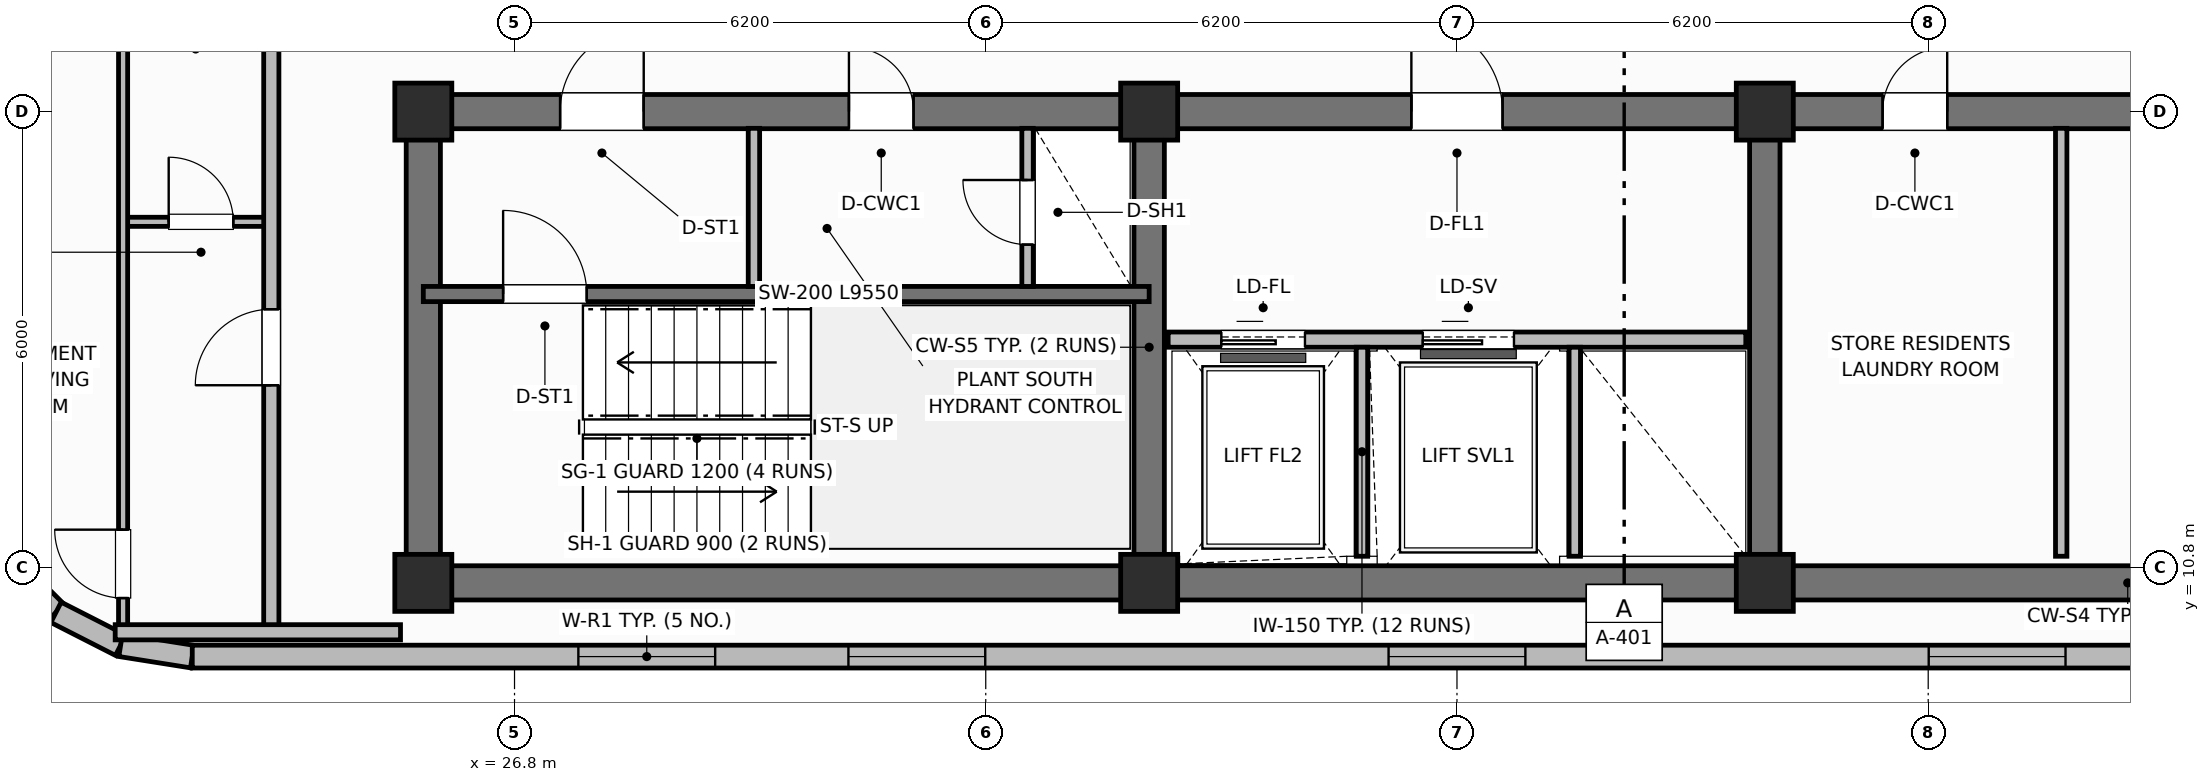
"""IFC4 building model, lengths in metres.
Left out: names, types, materials, properties, quantities, classifications, styles, units other than length and angle.
Written with IfcOpenShell. Run it as: python <this file> out.ifc"""

import sys

from ifc_helpers import new_model, si_unit, direction, frame, frame_2d, origin, origin_2d, place, context, subcontext, project, spatial, rectangle, extrude, element, fill, save


model = new_model("IFC4")
c1 = context("Model", 3, precision=1e-05, world=origin(), true_north=direction((0.0, 1.0)))
c2 = subcontext(c1, "Body", "Model", "MODEL_VIEW")
j1 = project(units=[si_unit("LENGTHUNIT", "METRE"), si_unit("PLANEANGLEUNIT", "RADIAN")], contexts=[c1])
p1 = place(None, origin())
s1 = spatial("IfcSite", under=j1, at=p1, CompositionType="ELEMENT")
p2 = place(p1, origin())
s2 = spatial("IfcBuilding", under=s1, at=p2, CompositionType="ELEMENT")
p3 = place(p2, frame((0.0, 0.0, 278.7)))
s3 = spatial("IfcBuildingStorey", under=s2, at=p3, CompositionType="ELEMENT", Elevation=278.7)
p4 = place(p3, frame((52.8, 10.6, 0.0), z_axis=(0.0, 0.0, 1.0), x_axis=(-1.0, 0.0, 0.0)))
e1 = element("IfcWall", 1, at=p4, inside=s3, PredefinedType="SHEAR", context=c2, shape_type="SweptSolid", body=[
    extrude(rectangle(XDim=27.2, YDim=0.45, at=frame_2d((13.6, 0.0))), origin(), (0.0, 0.0, 1.0), 3.7),
])
p5 = place(p3, frame((25.6, 10.825, 0.0), z_axis=(0.0, 0.0, 1.0), x_axis=(0.0, 1.0, 0.0)))
e2 = element("IfcWall", 2, at=p5, inside=s3, PredefinedType="SHEAR", context=c2, shape_type="SweptSolid", body=[
    extrude(rectangle(XDim=5.75, YDim=0.45, at=frame_2d((2.875, 0.0))), origin(), (0.0, 0.0, 1.0), 3.7),
])
p6 = place(p3, frame((25.6, 16.8, 0.0), z_axis=(0.0, 0.0, 1.0), x_axis=(1.0, 0.0, 0.0)))
e3 = element("IfcWall", 3, at=p6, inside=s3, PredefinedType="SHEAR", context=c2, shape_type="SweptSolid", body=[
    extrude(rectangle(XDim=27.2, YDim=0.45, at=frame_2d((13.6, 0.0))), origin(), (0.0, 0.0, 1.0), 3.7),
])
p7 = place(p6, frame((1.8, 0.0, 0.0)))
e4 = element("IfcOpeningElement", 4, at=p7, cuts=e3, PredefinedType="OPENING", context=c2, shape_type="SweptSolid", body=[
    extrude(rectangle(XDim=1.1, YDim=2.15, at=frame_2d((0.55, 1.075))), frame((0.0, 0.235, 0.0), z_axis=(0.0, -1.0, 0.0), x_axis=(1.0, 0.0, 0.0)), (0.0, 0.0, 1.0), 0.47),
])
p8 = place(p6, frame((5.6, 0.0, 0.0)))
e5 = element("IfcOpeningElement", 5, at=p8, cuts=e3, PredefinedType="OPENING", context=c2, shape_type="SweptSolid", body=[
    extrude(rectangle(XDim=0.85, YDim=2.1, at=frame_2d((0.425, 1.05))), frame((0.0, 0.235, 0.0), z_axis=(0.0, -1.0, 0.0), x_axis=(1.0, 0.0, 0.0)), (0.0, 0.0, 1.0), 0.47),
])
p9 = place(p6, frame((13.0, 0.0, 0.0)))
e6 = element("IfcOpeningElement", 6, at=p9, cuts=e3, PredefinedType="OPENING", context=c2, shape_type="SweptSolid", body=[
    extrude(rectangle(XDim=1.2, YDim=2.15, at=frame_2d((0.6, 1.075))), frame((0.0, 0.235, 0.0), z_axis=(0.0, -1.0, 0.0), x_axis=(1.0, 0.0, 0.0)), (0.0, 0.0, 1.0), 0.47),
])
p10 = place(p6, frame((19.2, 0.0, 0.0)))
e7 = element("IfcOpeningElement", 7, at=p10, cuts=e3, PredefinedType="OPENING", context=c2, shape_type="SweptSolid", body=[
    extrude(rectangle(XDim=0.85, YDim=2.1, at=frame_2d((0.425, 1.05))), frame((0.0, 0.235, 0.0), z_axis=(0.0, -1.0, 0.0), x_axis=(1.0, 0.0, 0.0)), (0.0, 0.0, 1.0), 0.47),
])
p11 = place(p6, frame((23.8, 0.0, 0.0)))
e8 = element("IfcOpeningElement", 8, at=p11, cuts=e3, PredefinedType="OPENING", context=c2, shape_type="SweptSolid", body=[
    extrude(rectangle(XDim=0.9, YDim=2.1, at=frame_2d((0.45, 1.05))), frame((0.0, 0.235, 0.0), z_axis=(0.0, -1.0, 0.0), x_axis=(1.0, 0.0, 0.0)), (0.0, 0.0, 1.0), 0.47),
])
for number, where, z_axis, x_axis in (
    (9, (35.15, 10.825, 0.0), (0.0, 0.0, 1.0), (0.0, 1.0, 0.0)),
    (10, (43.25, 10.825, 0.0), (0.0, 0.0, 1.0), (0.0, 1.0, 0.0)),
):
    element("IfcWall", number, at=place(p3, frame(where, z_axis=z_axis, x_axis=x_axis)), inside=s3, PredefinedType="SHEAR", context=c2, shape_type="SweptSolid", body=[
        extrude(rectangle(XDim=5.75, YDim=0.4, at=frame_2d((2.875, 0.0))), origin(), (0.0, 0.0, 1.0), 3.7),
    ])
for number, where, z_axis, x_axis in (
    (11, (25.6, 10.6, 0.0), (0.0, 0.0, 1.0), (1.0, 0.0, 0.0)),
    (12, (25.6, 16.8, 0.0), (0.0, 0.0, 1.0), (1.0, 0.0, 0.0)),
    (13, (35.15, 10.6, 0.0), (0.0, 0.0, 1.0), (1.0, 0.0, 0.0)),
    (14, (35.15, 16.8, 0.0), (0.0, 0.0, 1.0), (1.0, 0.0, 0.0)),
    (15, (43.25, 10.6, 0.0), (0.0, 0.0, 1.0), (1.0, 0.0, 0.0)),
    (16, (43.25, 16.8, 0.0), (0.0, 0.0, 1.0), (1.0, 0.0, 0.0)),
):
    element("IfcColumn", number, at=place(p3, frame(where, z_axis=z_axis, x_axis=x_axis)), inside=s3, PredefinedType="COLUMN", context=c2, shape_type="SweptSolid", body=[
        extrude(rectangle(XDim=0.75, YDim=0.75, at=origin_2d()), origin(), (0.0, 0.0, 1.0), 3.7),
    ])
p12 = place(p3, frame((20.093, 10.887, 0.0), z_axis=(0.0, 0.0, 1.0), x_axis=(0.707106781187, -0.707106781187, 0.0)))
e17 = element("IfcWall", 17, at=p12, inside=s3, PredefinedType="SOLIDWALL", context=c2, shape_type="SweptSolid", body=[
    extrude(rectangle(XDim=0.954, YDim=0.3, at=frame_2d((0.477, 0.0))), origin(), (0.0, 0.0, 1.0), 2.73),
])
p13 = place(p3, frame((20.767, 10.212, 0.0), z_axis=(0.0, 0.0, 1.0), x_axis=(0.891023873617, -0.45395644796, 0.0)))
e18 = element("IfcWall", 18, at=p13, inside=s3, PredefinedType="SOLIDWALL", context=c2, shape_type="SweptSolid", body=[
    extrude(rectangle(XDim=0.954, YDim=0.3, at=frame_2d((0.477, 0.0))), origin(), (0.0, 0.0, 1.0), 2.73),
])
p14 = place(p3, frame((21.617, 9.779, 0.0), z_axis=(0.0, 0.0, 1.0), x_axis=(0.987669453596, -0.156553666304, 0.0)))
e19 = element("IfcWall", 19, at=p14, inside=s3, PredefinedType="SOLIDWALL", context=c2, shape_type="SweptSolid", body=[
    extrude(rectangle(XDim=0.954, YDim=0.3, at=frame_2d((0.477, 0.0))), origin(), (0.0, 0.0, 1.0), 2.73),
])
p15 = place(p3, frame((22.56, 9.63, 0.0), z_axis=(0.0, 0.0, 1.0), x_axis=(1.0, 0.0, 0.0)))
e20 = element("IfcWall", 20, at=p15, inside=s3, PredefinedType="SOLIDWALL", context=c2, shape_type="SweptSolid", body=[
    extrude(rectangle(XDim=33.28, YDim=0.3, at=frame_2d((16.64, 0.0))), origin(), (0.0, 0.0, 1.0), 2.73),
])
p16 = place(p15, frame((5.08, 0.0, 0.76)))
e21 = element("IfcOpeningElement", 21, at=p16, cuts=e20, PredefinedType="OPENING", context=c2, shape_type="SweptSolid", body=[
    extrude(rectangle(XDim=1.8, YDim=1.85, at=frame_2d((0.9, 0.925))), frame((0.0, 0.16, 0.0), z_axis=(0.0, -1.0, 0.0), x_axis=(1.0, 0.0, 0.0)), (0.0, 0.0, 1.0), 0.32),
])
p17 = place(p15, frame((8.633, 0.0, 0.76)))
e22 = element("IfcOpeningElement", 22, at=p17, cuts=e20, PredefinedType="OPENING", context=c2, shape_type="SweptSolid", body=[
    extrude(rectangle(XDim=1.8, YDim=1.85, at=frame_2d((0.9, 0.925))), frame((0.0, 0.16, 0.0), z_axis=(0.0, -1.0, 0.0), x_axis=(1.0, 0.0, 0.0)), (0.0, 0.0, 1.0), 0.32),
])
p18 = place(p15, frame((15.74, 0.0, 0.76)))
e23 = element("IfcOpeningElement", 23, at=p18, cuts=e20, PredefinedType="OPENING", context=c2, shape_type="SweptSolid", body=[
    extrude(rectangle(XDim=1.8, YDim=1.85, at=frame_2d((0.9, 0.925))), frame((0.0, 0.16, 0.0), z_axis=(0.0, -1.0, 0.0), x_axis=(1.0, 0.0, 0.0)), (0.0, 0.0, 1.0), 0.32),
])
p19 = place(p15, frame((22.847, 0.0, 0.76)))
e24 = element("IfcOpeningElement", 24, at=p19, cuts=e20, PredefinedType="OPENING", context=c2, shape_type="SweptSolid", body=[
    extrude(rectangle(XDim=1.8, YDim=1.85, at=frame_2d((0.9, 0.925))), frame((0.0, 0.16, 0.0), z_axis=(0.0, -1.0, 0.0), x_axis=(1.0, 0.0, 0.0)), (0.0, 0.0, 1.0), 0.32),
])
p20 = place(p15, frame((26.4, 0.0, 0.76)))
e25 = element("IfcOpeningElement", 25, at=p20, cuts=e20, PredefinedType="OPENING", context=c2, shape_type="SweptSolid", body=[
    extrude(rectangle(XDim=1.8, YDim=1.85, at=frame_2d((0.9, 0.925))), frame((0.0, 0.16, 0.0), z_axis=(0.0, -1.0, 0.0), x_axis=(1.0, 0.0, 0.0)), (0.0, 0.0, 1.0), 0.32),
])
p21 = place(p3, frame((25.6, 14.4, 0.0), z_axis=(0.0, 0.0, 1.0), x_axis=(1.0, 0.0, 0.0)))
e26 = element("IfcWall", 26, at=p21, inside=s3, PredefinedType="SHEAR", context=c2, shape_type="SweptSolid", body=[
    extrude(rectangle(XDim=9.55, YDim=0.2, at=frame_2d((4.775, 0.0))), origin(), (0.0, 0.0, 1.0), 3.7),
])
p22 = place(p21, frame((1.05, 0.0, 0.0)))
e27 = element("IfcOpeningElement", 27, at=p22, cuts=e26, PredefinedType="OPENING", context=c2, shape_type="SweptSolid", body=[
    extrude(rectangle(XDim=1.1, YDim=2.15, at=frame_2d((0.55, 1.075))), frame((0.0, 0.11, 0.0), z_axis=(0.0, -1.0, 0.0), x_axis=(1.0, 0.0, 0.0)), (0.0, 0.0, 1.0), 0.22),
])
p23 = place(p3, frame((29.95, 14.5, 0.0), z_axis=(0.0, 0.0, 1.0), x_axis=(0.0, 1.0, 0.0)))
e28 = element("IfcWall", 28, at=p23, inside=s3, PredefinedType="PARTITIONING", context=c2, shape_type="SweptSolid", body=[
    extrude(rectangle(XDim=2.08, YDim=0.15, at=frame_2d((1.04, 0.0))), origin(), (0.0, 0.0, 1.0), 2.56),
])
p24 = place(p3, frame((33.55, 14.5, 0.0), z_axis=(0.0, 0.0, 1.0), x_axis=(0.0, 1.0, 0.0)))
e29 = element("IfcWall", 29, at=p24, inside=s3, PredefinedType="PARTITIONING", context=c2, shape_type="SweptSolid", body=[
    extrude(rectangle(XDim=2.08, YDim=0.15, at=frame_2d((1.04, 0.0))), origin(), (0.0, 0.0, 1.0), 2.56),
])
p25 = place(p24, frame((0.55, 0.0, 0.0)))
e30 = element("IfcOpeningElement", 30, at=p25, cuts=e29, PredefinedType="OPENING", context=c2, shape_type="SweptSolid", body=[
    extrude(rectangle(XDim=0.85, YDim=2.05, at=frame_2d((0.425, 1.025))), frame((0.0, 0.085, 0.0), z_axis=(0.0, -1.0, 0.0), x_axis=(1.0, 0.0, 0.0)), (0.0, 0.0, 1.0), 0.17),
])
p26 = place(p3, frame((35.4, 13.8, 0.0), z_axis=(0.0, 0.0, 1.0), x_axis=(1.0, 0.0, 0.0)))
e31 = element("IfcWall", 31, at=p26, inside=s3, PredefinedType="PARTITIONING", context=c2, shape_type="SweptSolid", body=[
    extrude(rectangle(XDim=7.6, YDim=0.2, at=frame_2d((3.8, 0.0))), origin(), (0.0, 0.0, 1.0), 2.33),
])
p27 = place(p26, frame((0.7, 0.0, 0.0)))
e32 = element("IfcOpeningElement", 32, at=p27, cuts=e31, PredefinedType="OPENING", context=c2, shape_type="SweptSolid", body=[
    extrude(rectangle(XDim=1.1, YDim=2.15, at=frame_2d((0.55, 1.075))), frame((0.0, 0.11, 0.0), z_axis=(0.0, -1.0, 0.0), x_axis=(1.0, 0.0, 0.0)), (0.0, 0.0, 1.0), 0.22),
])
p28 = place(p26, frame((3.35, 0.0, 0.0)))
e33 = element("IfcOpeningElement", 33, at=p28, cuts=e31, PredefinedType="OPENING", context=c2, shape_type="SweptSolid", body=[
    extrude(rectangle(XDim=1.2, YDim=2.15, at=frame_2d((0.6, 1.075))), frame((0.0, 0.11, 0.0), z_axis=(0.0, -1.0, 0.0), x_axis=(1.0, 0.0, 0.0)), (0.0, 0.0, 1.0), 0.22),
])
for number, where, z_axis, x_axis in (
    (34, (37.95, 10.95, 0.0), (0.0, 0.0, 1.0), (0.0, 1.0, 0.0)),
    (35, (40.75, 10.95, 0.0), (0.0, 0.0, 1.0), (0.0, 1.0, 0.0)),
):
    element("IfcWall", number, at=place(p3, frame(where, z_axis=z_axis, x_axis=x_axis)), inside=s3, PredefinedType="PARTITIONING", context=c2, shape_type="SweptSolid", body=[
        extrude(rectangle(XDim=2.75, YDim=0.15, at=frame_2d((1.375, 0.0))), origin(), (0.0, 0.0, 1.0), 2.56),
    ])
p29 = place(p3, frame((47.15, 10.95, 0.0), z_axis=(0.0, 0.0, 1.0), x_axis=(0.0, 1.0, 0.0)))
e36 = element("IfcWall", 36, at=p29, inside=s3, PredefinedType="PARTITIONING", context=c2, shape_type="SweptSolid", body=[
    extrude(rectangle(XDim=5.63, YDim=0.15, at=frame_2d((2.815, 0.0))), origin(), (0.0, 0.0, 1.0), 2.56),
])
p30 = place(p3, frame((21.65, 15.35, 0.0), z_axis=(0.0, 0.0, 1.0), x_axis=(1.0, 0.0, 0.0)))
e37 = element("IfcWall", 37, at=p30, inside=s3, PredefinedType="PARTITIONING", context=c2, shape_type="SweptSolid", body=[
    extrude(rectangle(XDim=1.95, YDim=0.12, at=frame_2d((0.975, 0.0))), origin(), (0.0, 0.0, 1.0), 2.56),
])
p31 = place(p30, frame((0.6, 0.0, 0.0)))
e38 = element("IfcOpeningElement", 38, at=p31, cuts=e37, PredefinedType="OPENING", context=c2, shape_type="SweptSolid", body=[
    extrude(rectangle(XDim=0.85, YDim=2.1, at=frame_2d((0.425, 1.05))), frame((0.0, 0.07, 0.0), z_axis=(0.0, -1.0, 0.0), x_axis=(1.0, 0.0, 0.0)), (0.0, 0.0, 1.0), 0.14),
])
p32 = place(p3, frame((21.65, 9.99, 0.0), z_axis=(0.0, 0.0, 1.0), x_axis=(0.0, 1.0, 0.0)))
e39 = element("IfcWall", 39, at=p32, inside=s3, PredefinedType="PARTITIONING", context=c2, shape_type="SweptSolid", body=[
    extrude(rectangle(XDim=36.42, YDim=0.12, at=frame_2d((18.21, 0.0))), origin(), (0.0, 0.0, 1.0), 2.56),
])
p33 = place(p32, frame((0.41, 0.0, 0.0)))
e40 = element("IfcOpeningElement", 40, at=p33, cuts=e39, PredefinedType="OPENING", context=c2, shape_type="SweptSolid", body=[
    extrude(rectangle(XDim=0.9, YDim=2.1, at=frame_2d((0.45, 1.05))), frame((0.0, 0.07, 0.0), z_axis=(0.0, -1.0, 0.0), x_axis=(1.0, 0.0, 0.0)), (0.0, 0.0, 1.0), 0.14),
])
p34 = place(p32, frame((15.56, 0.0, 0.0)))
e41 = element("IfcOpeningElement", 41, at=p34, cuts=e39, PredefinedType="OPENING", context=c2, shape_type="SweptSolid", body=[
    extrude(rectangle(XDim=0.82, YDim=2.08, at=frame_2d((0.41, 1.04))), frame((0.0, 0.07, 0.0), z_axis=(0.0, -1.0, 0.0), x_axis=(1.0, 0.0, 0.0)), (0.0, 0.0, 1.0), 0.14),
])
p35 = place(p3, frame((23.6, 9.95, 0.0), z_axis=(0.0, 0.0, 1.0), x_axis=(0.0, 1.0, 0.0)))
e42 = element("IfcWall", 42, at=p35, inside=s3, PredefinedType="PARTITIONING", context=c2, shape_type="SweptSolid", body=[
    extrude(rectangle(XDim=36.5, YDim=0.2, at=frame_2d((18.25, 0.0))), origin(), (0.0, 0.0, 1.0), 2.56),
])
p36 = place(p35, frame((3.25, 0.0, 0.0)))
e43 = element("IfcOpeningElement", 43, at=p36, cuts=e42, PredefinedType="OPENING", context=c2, shape_type="SweptSolid", body=[
    extrude(rectangle(XDim=1.0, YDim=2.15, at=frame_2d((0.5, 1.075))), frame((0.0, 0.11, 0.0), z_axis=(0.0, -1.0, 0.0), x_axis=(1.0, 0.0, 0.0)), (0.0, 0.0, 1.0), 0.22),
])
p37 = place(p3, frame((21.546, 9.95, 0.0), z_axis=(0.0, 0.0, 1.0), x_axis=(1.0, 0.0, 0.0)))
e44 = element("IfcWall", 44, at=p37, inside=s3, PredefinedType="PARTITIONING", context=c2, shape_type="SweptSolid", body=[
    extrude(rectangle(XDim=3.754, YDim=0.2, at=frame_2d((1.877, 0.0))), origin(), (0.0, 0.0, 1.0), 2.56),
])
p38 = place(p16, origin())
e45 = element("IfcWindow", 45, at=p38, inside=s3, PartitioningType="SINGLE_PANEL", PredefinedType="WINDOW", context=c2, shape_type="SweptSolid", body=[
    extrude(rectangle(XDim=1.8, YDim=1.85, at=frame_2d((0.9, 0.925))), frame((0.0, 0.03, 0.0), z_axis=(0.0, -1.0, 0.0), x_axis=(1.0, 0.0, 0.0)), (0.0, 0.0, 1.0), 0.06),
])
fill(e21, e45)
p39 = place(p17, origin())
e46 = element("IfcWindow", 46, at=p39, inside=s3, PartitioningType="SINGLE_PANEL", PredefinedType="WINDOW", context=c2, shape_type="SweptSolid", body=[
    extrude(rectangle(XDim=1.8, YDim=1.85, at=frame_2d((0.9, 0.925))), frame((0.0, 0.03, 0.0), z_axis=(0.0, -1.0, 0.0), x_axis=(1.0, 0.0, 0.0)), (0.0, 0.0, 1.0), 0.06),
])
fill(e22, e46)
p40 = place(p18, origin())
e47 = element("IfcWindow", 47, at=p40, inside=s3, PartitioningType="SINGLE_PANEL", PredefinedType="WINDOW", context=c2, shape_type="SweptSolid", body=[
    extrude(rectangle(XDim=1.8, YDim=1.85, at=frame_2d((0.9, 0.925))), frame((0.0, 0.03, 0.0), z_axis=(0.0, -1.0, 0.0), x_axis=(1.0, 0.0, 0.0)), (0.0, 0.0, 1.0), 0.06),
])
fill(e23, e47)
p41 = place(p19, origin())
e48 = element("IfcWindow", 48, at=p41, inside=s3, PartitioningType="SINGLE_PANEL", PredefinedType="WINDOW", context=c2, shape_type="SweptSolid", body=[
    extrude(rectangle(XDim=1.8, YDim=1.85, at=frame_2d((0.9, 0.925))), frame((0.0, 0.03, 0.0), z_axis=(0.0, -1.0, 0.0), x_axis=(1.0, 0.0, 0.0)), (0.0, 0.0, 1.0), 0.06),
])
fill(e24, e48)
p42 = place(p22, origin())
e49 = element("IfcDoor", 49, at=p42, inside=s3, OperationType="SINGLE_SWING_LEFT", PredefinedType="DOOR", context=c2, shape_type="SweptSolid", body=[
    extrude(rectangle(XDim=1.1, YDim=2.15, at=frame_2d((0.55, 1.075))), frame((0.0, 0.025, 0.0), z_axis=(0.0, -1.0, 0.0), x_axis=(1.0, 0.0, 0.0)), (0.0, 0.0, 1.0), 0.05),
])
fill(e27, e49)
p43 = place(p25, origin())
e50 = element("IfcDoor", 50, at=p43, inside=s3, OperationType="SINGLE_SWING_RIGHT", PredefinedType="TRAPDOOR", context=c2, shape_type="SweptSolid", body=[
    extrude(rectangle(XDim=0.85, YDim=2.05, at=frame_2d((0.425, 1.025))), frame((0.0, 0.025, 0.0), z_axis=(0.0, -1.0, 0.0), x_axis=(1.0, 0.0, 0.0)), (0.0, 0.0, 1.0), 0.05),
])
fill(e30, e50)
p44 = place(p27, origin())
e51 = element("IfcDoor", 51, at=p44, inside=s3, OperationType="SLIDING_TO_LEFT", PredefinedType="DOOR", context=c2, shape_type="SweptSolid", body=[
    extrude(rectangle(XDim=1.1, YDim=2.15, at=frame_2d((0.55, 1.075))), frame((0.0, 0.025, 0.0), z_axis=(0.0, -1.0, 0.0), x_axis=(1.0, 0.0, 0.0)), (0.0, 0.0, 1.0), 0.05),
])
fill(e32, e51)
p45 = place(p28, origin())
e52 = element("IfcDoor", 52, at=p45, inside=s3, OperationType="SLIDING_TO_LEFT", PredefinedType="DOOR", context=c2, shape_type="SweptSolid", body=[
    extrude(rectangle(XDim=1.2, YDim=2.15, at=frame_2d((0.6, 1.075))), frame((0.0, 0.025, 0.0), z_axis=(0.0, -1.0, 0.0), x_axis=(1.0, 0.0, 0.0)), (0.0, 0.0, 1.0), 0.05),
])
fill(e33, e52)
p46 = place(p31, origin())
e53 = element("IfcDoor", 53, at=p46, inside=s3, OperationType="SINGLE_SWING_LEFT", PredefinedType="DOOR", context=c2, shape_type="SweptSolid", body=[
    extrude(rectangle(XDim=0.85, YDim=2.1, at=frame_2d((0.425, 1.05))), frame((0.0, 0.025, 0.0), z_axis=(0.0, -1.0, 0.0), x_axis=(1.0, 0.0, 0.0)), (0.0, 0.0, 1.0), 0.05),
])
fill(e38, e53)
p47 = place(p33, origin())
e54 = element("IfcDoor", 54, at=p47, inside=s3, OperationType="SINGLE_SWING_RIGHT", PredefinedType="DOOR", context=c2, shape_type="SweptSolid", body=[
    extrude(rectangle(XDim=0.9, YDim=2.1, at=frame_2d((0.45, 1.05))), frame((0.0, 0.025, 0.0), z_axis=(0.0, -1.0, 0.0), x_axis=(1.0, 0.0, 0.0)), (0.0, 0.0, 1.0), 0.05),
])
fill(e40, e54)
p48 = place(p36, origin())
e55 = element("IfcDoor", 55, at=p48, inside=s3, OperationType="SINGLE_SWING_LEFT", PredefinedType="DOOR", context=c2, shape_type="SweptSolid", body=[
    extrude(rectangle(XDim=1.0, YDim=2.15, at=frame_2d((0.5, 1.075))), frame((0.0, 0.025, 0.0), z_axis=(0.0, -1.0, 0.0), x_axis=(1.0, 0.0, 0.0)), (0.0, 0.0, 1.0), 0.05),
])
fill(e43, e55)
p49 = place(p7, origin())
e56 = element("IfcDoor", 56, at=p49, inside=s3, OperationType="SINGLE_SWING_RIGHT", PredefinedType="DOOR", context=c2, shape_type="SweptSolid", body=[
    extrude(rectangle(XDim=1.1, YDim=2.15, at=frame_2d((0.55, 1.075))), frame((0.0, 0.025, 0.0), z_axis=(0.0, -1.0, 0.0), x_axis=(1.0, 0.0, 0.0)), (0.0, 0.0, 1.0), 0.05),
])
fill(e4, e56)
p50 = place(p8, origin())
e57 = element("IfcDoor", 57, at=p50, inside=s3, OperationType="SINGLE_SWING_LEFT", PredefinedType="DOOR", context=c2, shape_type="SweptSolid", body=[
    extrude(rectangle(XDim=0.85, YDim=2.1, at=frame_2d((0.425, 1.05))), frame((0.0, 0.025, 0.0), z_axis=(0.0, -1.0, 0.0), x_axis=(1.0, 0.0, 0.0)), (0.0, 0.0, 1.0), 0.05),
])
fill(e5, e57)
p51 = place(p9, origin())
e58 = element("IfcDoor", 58, at=p51, inside=s3, OperationType="SINGLE_SWING_LEFT", PredefinedType="DOOR", context=c2, shape_type="SweptSolid", body=[
    extrude(rectangle(XDim=1.2, YDim=2.15, at=frame_2d((0.6, 1.075))), frame((0.0, 0.025, 0.0), z_axis=(0.0, -1.0, 0.0), x_axis=(1.0, 0.0, 0.0)), (0.0, 0.0, 1.0), 0.05),
])
fill(e6, e58)
p52 = place(p10, origin())
e59 = element("IfcDoor", 59, at=p52, inside=s3, OperationType="SINGLE_SWING_RIGHT", PredefinedType="DOOR", context=c2, shape_type="SweptSolid", body=[
    extrude(rectangle(XDim=0.85, YDim=2.1, at=frame_2d((0.425, 1.05))), frame((0.0, 0.025, 0.0), z_axis=(0.0, -1.0, 0.0), x_axis=(1.0, 0.0, 0.0)), (0.0, 0.0, 1.0), 0.05),
])
fill(e7, e59)
save(model, sys.argv[1])
